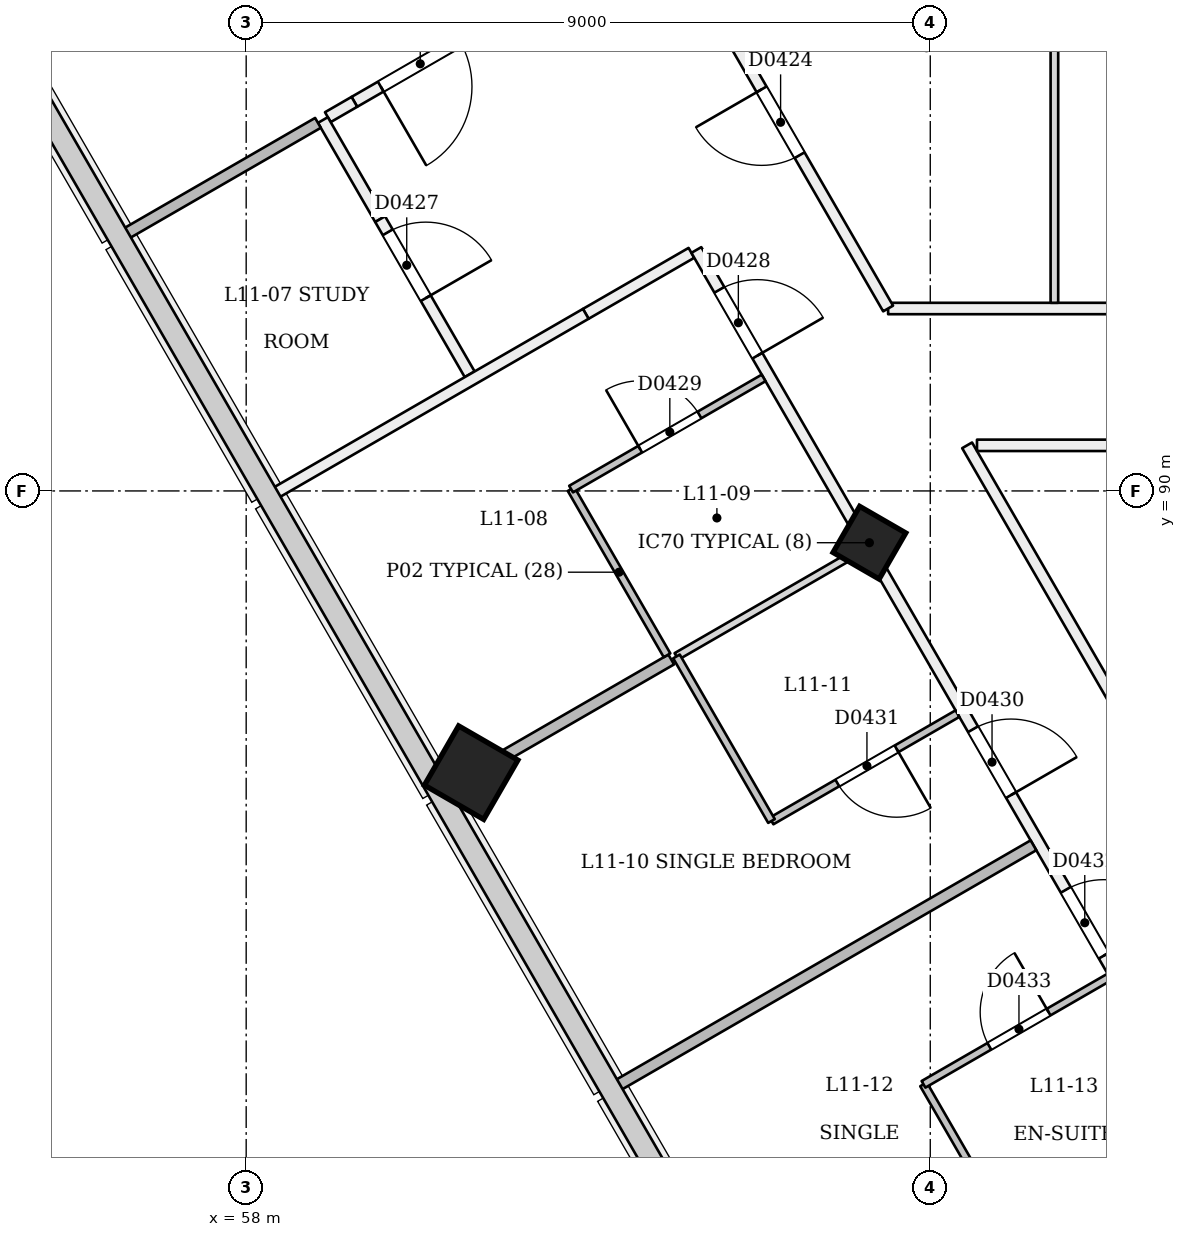
"""IFC4 building model, lengths in metres.
Left out: names, types, materials, properties, quantities, classifications, styles, units other than length and angle.
Written with IfcOpenShell. Run it as: python <this file> out.ifc"""

import sys

from ifc_helpers import new_model, si_unit, direction, frame, frame_2d, origin, origin_2d, place, context, subcontext, project, spatial, rectangle, extrude, element, fill, save


model = new_model("IFC4")
c1 = context("Model", 3, precision=1e-05, world=origin(), true_north=direction((0.0, 1.0)))
c2 = subcontext(c1, "Body", "Model", "MODEL_VIEW")
j1 = project(units=[si_unit("LENGTHUNIT", "METRE"), si_unit("PLANEANGLEUNIT", "RADIAN")], contexts=[c1])
p1 = place(None, origin())
s1 = spatial("IfcSite", under=j1, at=p1, CompositionType="ELEMENT")
p2 = place(p1, origin())
s2 = spatial("IfcBuilding", under=s1, at=p2, CompositionType="ELEMENT")
p3 = place(p2, frame((0.0, 0.0, 48.6)))
s3 = spatial("IfcBuildingStorey", under=s2, at=p3, CompositionType="ELEMENT", Elevation=48.6)
p4 = place(p3, frame((66.172, 89.272, -0.021), z_axis=(0.022222852987, 0.038483477124, 0.999012095419), x_axis=(-0.865643603437, -0.499179364078, 0.03848524793)))
e1 = element("IfcColumn", 1, at=p4, inside=s3, PredefinedType="COLUMN", context=c2, shape_type="SweptSolid", body=[
    extrude(rectangle(XDim=0.7, YDim=0.7, at=origin_2d()), origin(), (0.0, 0.0, 1.0), 3.604),
])
p5 = place(p3, frame((60.933, 86.247, -0.027), z_axis=(0.02215519141, 0.038415882353, 0.999016199807), x_axis=(-0.865366159559, -0.499666334629, 0.038405259133)))
e2 = element("IfcColumn", 2, at=p5, inside=s3, PredefinedType="COLUMN", context=c2, shape_type="SweptSolid", body=[
    extrude(rectangle(XDim=0.9, YDim=0.9, at=origin_2d()), origin(), (0.0, 0.0, 1.0), 3.604),
])
p6 = place(p3, frame((70.125, 92.4, 0.0), z_axis=(0.0, 0.0, 1.0), x_axis=(-1.0, 0.0, 0.0)))
e3 = element("IfcWall", 3, at=p6, inside=s3, PredefinedType="PARTITIONING", context=c2, shape_type="SweptSolid", body=[
    extrude(rectangle(XDim=3.679, YDim=0.15, at=frame_2d((1.84, 0.0))), origin(), (0.0, 0.0, 1.0), 3.1),
])
p7 = place(p3, frame((66.446, 92.4, 0.0), z_axis=(0.0, 0.0, 1.0), x_axis=(-0.500000789788, 0.8660249478, 0.0)))
e4 = element("IfcWall", 4, at=p7, inside=s3, PredefinedType="PARTITIONING", context=c2, shape_type="SweptSolid", body=[
    extrude(rectangle(XDim=5.011, YDim=0.15, at=frame_2d((2.506, 0.0))), origin(), (0.0, 0.0, 1.0), 3.1),
])
p8 = place(p7, frame((2.329, 0.0, 0.0)))
e5 = element("IfcOpeningElement", 5, at=p8, cuts=e4, PredefinedType="OPENING", context=c2, shape_type="SweptSolid", body=[
    extrude(rectangle(XDim=1.0, YDim=2.1, at=frame_2d((0.5, 1.05))), frame((0.0, 0.085, 0.0), z_axis=(0.0, -1.0, 0.0), x_axis=(1.0, 0.0, 0.0)), (0.0, 0.0, 1.0), 0.171),
])
p9 = place(p3, frame((61.954, 96.58, 0.0), z_axis=(0.0, 0.0, 1.0), x_axis=(-0.866013036001, -0.500021421018, 0.0)))
e6 = element("IfcWall", 6, at=p9, inside=s3, PredefinedType="PARTITIONING", context=c2, shape_type="SweptSolid", body=[
    extrude(rectangle(XDim=2.922, YDim=0.15, at=frame_2d((1.461, 0.0))), origin(), (0.0, 0.0, 1.0), 3.1),
])
p10 = place(p9, frame((1.321, 0.0, 0.0)))
e7 = element("IfcOpeningElement", 7, at=p10, cuts=e6, PredefinedType="OPENING", context=c2, shape_type="SweptSolid", body=[
    extrude(rectangle(XDim=1.2, YDim=2.1, at=frame_2d((0.6, 1.05))), frame((0.0, 0.085, 0.0), z_axis=(0.0, -1.0, 0.0), x_axis=(1.0, 0.0, 0.0)), (0.0, 0.0, 1.0), 0.171),
])
p11 = place(p3, frame((59.424, 95.119, 0.0), z_axis=(0.0, 0.0, 1.0), x_axis=(-0.866074730264, -0.499914554297, 0.0)))
e8 = element("IfcWall", 8, at=p11, inside=s3, PredefinedType="PARTITIONING", context=c2, shape_type="SweptSolid", body=[
    extrude(rectangle(XDim=0.403, YDim=0.15, at=frame_2d((0.202, 0.0))), origin(), (0.0, 0.0, 1.0), 2.6),
])
p12 = place(p3, frame((59.009, 94.88, 0.0), z_axis=(0.0, 0.0, 1.0), x_axis=(0.500045262687, -0.865999269783, 0.0)))
e9 = element("IfcWall", 9, at=p12, inside=s3, PredefinedType="PARTITIONING", context=c2, shape_type="SweptSolid", body=[
    extrude(rectangle(XDim=1.506, YDim=0.15, at=frame_2d((0.753, 0.0))), origin(), (0.0, 0.0, 1.0), 2.6),
])
p13 = place(p3, frame((59.762, 93.576, 0.0), z_axis=(0.0, 0.0, 1.0), x_axis=(0.500027327967, -0.8660096254, 0.0)))
e10 = element("IfcWall", 10, at=p13, inside=s3, PredefinedType="PARTITIONING", context=c2, shape_type="SweptSolid", body=[
    extrude(rectangle(XDim=2.357, YDim=0.15, at=frame_2d((1.178, 0.0))), origin(), (0.0, 0.0, 1.0), 3.1),
])
p14 = place(p13, frame((0.2, 0.0, 0.0)))
e11 = element("IfcOpeningElement", 11, at=p14, cuts=e10, PredefinedType="OPENING", context=c2, shape_type="SweptSolid", body=[
    extrude(rectangle(XDim=1.0, YDim=2.1, at=frame_2d((0.5, 1.05))), frame((0.0, 0.085, 0.0), z_axis=(0.0, -1.0, 0.0), x_axis=(1.0, 0.0, 0.0)), (0.0, 0.0, 1.0), 0.171),
])
p15 = place(p3, frame((62.468, 92.33, 0.0), z_axis=(0.0, 0.0, 1.0), x_axis=(0.866053882819, 0.499950669621, 0.0)))
e12 = element("IfcWall", 12, at=p15, inside=s3, PredefinedType="PARTITIONING", context=c2, shape_type="SweptSolid", body=[
    extrude(rectangle(XDim=1.605, YDim=0.15, at=frame_2d((0.803, 0.0))), origin(), (0.0, 0.0, 1.0), 3.1),
])
p16 = place(p3, frame((63.923, 93.17, 0.0), z_axis=(0.0, 0.0, 1.0), x_axis=(0.500002225217, -0.866024119051, 0.0)))
e13 = element("IfcWall", 13, at=p16, inside=s3, PredefinedType="PARTITIONING", context=c2, shape_type="SweptSolid", body=[
    extrude(rectangle(XDim=38.6, YDim=0.15, at=frame_2d((19.3, 0.0))), origin(), (0.0, 0.0, 1.0), 2.7),
])
p17 = place(p16, frame((0.605, 0.0, 0.0)))
e14 = element("IfcOpeningElement", 14, at=p17, cuts=e13, PredefinedType="OPENING", context=c2, shape_type="SweptSolid", body=[
    extrude(rectangle(XDim=1.0, YDim=2.1, at=frame_2d((0.5, 1.05))), frame((0.0, 0.085, 0.0), z_axis=(0.0, -1.0, 0.0), x_axis=(1.0, 0.0, 0.0)), (0.0, 0.0, 1.0), 0.171),
])
p18 = place(p16, frame((7.28, 0.0, 0.0)))
e15 = element("IfcOpeningElement", 15, at=p18, cuts=e13, PredefinedType="OPENING", context=c2, shape_type="SweptSolid", body=[
    extrude(rectangle(XDim=1.0, YDim=2.1, at=frame_2d((0.5, 1.05))), frame((0.0, 0.085, 0.0), z_axis=(0.0, -1.0, 0.0), x_axis=(1.0, 0.0, 0.0)), (0.0, 0.0, 1.0), 0.171),
])
p19 = place(p16, frame((9.72, 0.0, 0.0)))
e16 = element("IfcOpeningElement", 16, at=p19, cuts=e13, PredefinedType="OPENING", context=c2, shape_type="SweptSolid", body=[
    extrude(rectangle(XDim=1.0, YDim=2.1, at=frame_2d((0.5, 1.05))), frame((0.0, 0.085, 0.0), z_axis=(0.0, -1.0, 0.0), x_axis=(1.0, 0.0, 0.0)), (0.0, 0.0, 1.0), 0.171),
])
p20 = place(p16, frame((16.395, 0.0, 0.0)))
e17 = element("IfcOpeningElement", 17, at=p20, cuts=e13, PredefinedType="OPENING", context=c2, shape_type="SweptSolid", body=[
    extrude(rectangle(XDim=1.0, YDim=2.1, at=frame_2d((0.5, 1.05))), frame((0.0, 0.085, 0.0), z_axis=(0.0, -1.0, 0.0), x_axis=(1.0, 0.0, 0.0)), (0.0, 0.0, 1.0), 0.171),
])
p21 = place(p16, frame((18.72, 0.0, 0.0)))
e18 = element("IfcOpeningElement", 18, at=p21, cuts=e13, PredefinedType="OPENING", context=c2, shape_type="SweptSolid", body=[
    extrude(rectangle(XDim=1.0, YDim=2.1, at=frame_2d((0.5, 1.05))), frame((0.0, 0.085, 0.0), z_axis=(0.0, -1.0, 0.0), x_axis=(1.0, 0.0, 0.0)), (0.0, 0.0, 1.0), 0.171),
])
p22 = place(p16, frame((25.395, 0.0, 0.0)))
e19 = element("IfcOpeningElement", 19, at=p22, cuts=e13, PredefinedType="OPENING", context=c2, shape_type="SweptSolid", body=[
    extrude(rectangle(XDim=1.0, YDim=2.1, at=frame_2d((0.5, 1.05))), frame((0.0, 0.085, 0.0), z_axis=(0.0, -1.0, 0.0), x_axis=(1.0, 0.0, 0.0)), (0.0, 0.0, 1.0), 0.171),
])
p23 = place(p16, frame((27.605, 0.0, 0.0)))
e20 = element("IfcOpeningElement", 20, at=p23, cuts=e13, PredefinedType="OPENING", context=c2, shape_type="SweptSolid", body=[
    extrude(rectangle(XDim=1.0, YDim=2.1, at=frame_2d((0.5, 1.05))), frame((0.0, 0.085, 0.0), z_axis=(0.0, -1.0, 0.0), x_axis=(1.0, 0.0, 0.0)), (0.0, 0.0, 1.0), 0.171),
])
p24 = place(p16, frame((34.28, 0.0, 0.0)))
e21 = element("IfcOpeningElement", 21, at=p24, cuts=e13, PredefinedType="OPENING", context=c2, shape_type="SweptSolid", body=[
    extrude(rectangle(XDim=1.0, YDim=2.1, at=frame_2d((0.5, 1.05))), frame((0.0, 0.085, 0.0), z_axis=(0.0, -1.0, 0.0), x_axis=(1.0, 0.0, 0.0)), (0.0, 0.0, 1.0), 0.171),
])
p25 = place(p16, frame((37.342, 0.0, 0.0)))
e22 = element("IfcOpeningElement", 22, at=p25, cuts=e13, PredefinedType="OPENING", context=c2, shape_type="SweptSolid", body=[
    extrude(rectangle(XDim=1.0, YDim=2.1, at=frame_2d((0.5, 1.05))), frame((0.0, 0.085, 0.0), z_axis=(0.0, -1.0, 0.0), x_axis=(1.0, 0.0, 0.0)), (0.0, 0.0, 1.0), 0.171),
])
p26 = place(p3, frame((85.0, 60.262, 0.0), z_axis=(0.0, 0.0, 1.0), x_axis=(-0.499998554739, 0.866026238205, 0.0)))
e23 = element("IfcWall", 23, at=p26, inside=s3, PredefinedType="PARTITIONING", context=c2, shape_type="SweptSolid", body=[
    extrude(rectangle(XDim=35.031, YDim=0.15, at=frame_2d((17.515, 0.0))), origin(), (0.0, 0.0, 1.0), 3.1),
])
p27 = place(p26, frame((6.026, 0.0, 0.0)))
e24 = element("IfcOpeningElement", 24, at=p27, cuts=e23, PredefinedType="OPENING", context=c2, shape_type="SweptSolid", body=[
    extrude(rectangle(XDim=1.2, YDim=2.1, at=frame_2d((0.6, 1.05))), frame((0.0, 0.085, 0.0), z_axis=(0.0, -1.0, 0.0), x_axis=(1.0, 0.0, 0.0)), (0.0, 0.0, 1.0), 0.171),
])
p28 = place(p26, frame((19.295, 0.0, 0.0)))
e25 = element("IfcOpeningElement", 25, at=p28, cuts=e23, PredefinedType="OPENING", context=c2, shape_type="SweptSolid", body=[
    extrude(rectangle(XDim=1.2, YDim=2.1, at=frame_2d((0.6, 1.05))), frame((0.0, 0.085, 0.0), z_axis=(0.0, -1.0, 0.0), x_axis=(1.0, 0.0, 0.0)), (0.0, 0.0, 1.0), 0.171),
])
p29 = place(p26, frame((28.126, 0.0, 0.0)))
e26 = element("IfcOpeningElement", 26, at=p29, cuts=e23, PredefinedType="OPENING", context=c2, shape_type="SweptSolid", body=[
    extrude(rectangle(XDim=1.2, YDim=2.1, at=frame_2d((0.6, 1.05))), frame((0.0, 0.085, 0.0), z_axis=(0.0, -1.0, 0.0), x_axis=(1.0, 0.0, 0.0)), (0.0, 0.0, 1.0), 0.171),
])
p30 = place(p26, frame((11.927, 0.0, 0.0)))
e27 = element("IfcOpeningElement", 27, at=p30, cuts=e23, PredefinedType="OPENING", context=c2, shape_type="SweptSolid", body=[
    extrude(rectangle(XDim=1.2, YDim=2.1, at=frame_2d((0.6, 1.05))), frame((0.0, 0.085, 0.0), z_axis=(0.0, -1.0, 0.0), x_axis=(1.0, 0.0, 0.0)), (0.0, 0.0, 1.0), 0.171),
])
p31 = place(p26, frame((16.039, 0.0, 0.0)))
e28 = element("IfcOpeningElement", 28, at=p31, cuts=e23, PredefinedType="OPENING", context=c2, shape_type="SweptSolid", body=[
    extrude(rectangle(XDim=1.2, YDim=2.1, at=frame_2d((0.6, 1.05))), frame((0.0, 0.085, 0.0), z_axis=(0.0, -1.0, 0.0), x_axis=(1.0, 0.0, 0.0)), (0.0, 0.0, 1.0), 0.171),
])
p32 = place(p26, frame((23.133, 0.0, 0.0)))
e29 = element("IfcOpeningElement", 29, at=p32, cuts=e23, PredefinedType="OPENING", context=c2, shape_type="SweptSolid", body=[
    extrude(rectangle(XDim=1.0, YDim=2.1, at=frame_2d((0.5, 1.05))), frame((0.0, 0.085, 0.0), z_axis=(0.0, -1.0, 0.0), x_axis=(1.0, 0.0, 0.0)), (0.0, 0.0, 1.0), 0.171),
])
p33 = place(p3, frame((67.615, 90.6, 0.0), z_axis=(0.0, 0.0, 1.0), x_axis=(0.999999997696, -6.7885206e-05, 0.0)))
e30 = element("IfcWall", 30, at=p33, inside=s3, PredefinedType="PARTITIONING", context=c2, shape_type="SweptSolid", body=[
    extrude(rectangle(XDim=14.385, YDim=0.15, at=frame_2d((7.193, 0.0))), origin(), (0.0, 0.0, 1.0), 3.1),
])
p34 = place(p3, frame((68.633, 104.9, 0.0), z_axis=(0.0, 0.0, 1.0), x_axis=(0.0, -1.0, 0.0)))
e31 = element("IfcWall", 31, at=p34, inside=s3, PredefinedType="PARTITIONING", context=c2, shape_type="SweptSolid", body=[
    extrude(rectangle(XDim=12.425, YDim=0.1, at=frame_2d((6.212, 0.0))), origin(), (0.0, 0.0, 1.0), 2.6),
])
p35 = place(p3, frame((56.394, 93.37, 0.0), z_axis=(0.0, 0.0, 1.0), x_axis=(0.866010265175, 0.500026219923, 0.0)))
e32 = element("IfcWall", 32, at=p35, inside=s3, PredefinedType="PARTITIONING", context=c2, shape_type="SweptSolid", body=[
    extrude(rectangle(XDim=2.945, YDim=0.15, at=frame_2d((1.473, 0.0))), origin(), (0.0, 0.0, 1.0), 2.6),
])
p36 = place(p3, frame((58.363, 89.96, 0.0), z_axis=(0.0, 0.0, 1.0), x_axis=(0.866015756104, 0.5000167099, 0.0)))
e33 = element("IfcWall", 33, at=p36, inside=s3, PredefinedType="PARTITIONING", context=c2, shape_type="SweptSolid", body=[
    extrude(rectangle(XDim=4.74, YDim=0.15, at=frame_2d((2.37, 0.0))), origin(), (0.0, 0.0, 1.0), 2.6),
])
p37 = place(p3, frame((63.537, 87.838, 0.0), z_axis=(0.0, 0.0, 1.0), x_axis=(-0.500090717682, 0.865973021571, 0.0)))
e34 = element("IfcWall", 34, at=p37, inside=s3, PredefinedType="PARTITIONING", context=c2, shape_type="SweptSolid", body=[
    extrude(rectangle(XDim=2.525, YDim=0.1, at=frame_2d((1.262, 0.0))), origin(), (0.0, 0.0, 1.0), 2.7),
])
p38 = place(p3, frame((62.274, 90.024, 0.0), z_axis=(0.0, 0.0, 1.0), x_axis=(0.86601045545, 0.500025890382, 0.0)))
e35 = element("IfcWall", 35, at=p38, inside=s3, PredefinedType="PARTITIONING", context=c2, shape_type="SweptSolid", body=[
    extrude(rectangle(XDim=2.925, YDim=0.1, at=frame_2d((1.462, 0.0))), origin(), (0.0, 0.0, 1.0), 3.1),
])
p39 = place(p38, frame((1.05, 0.0, 0.0)))
e36 = element("IfcOpeningElement", 36, at=p39, cuts=e35, PredefinedType="OPENING", context=c2, shape_type="SweptSolid", body=[
    extrude(rectangle(XDim=0.9, YDim=2.1, at=frame_2d((0.45, 1.05))), frame((0.0, 0.061, 0.0), z_axis=(0.0, -1.0, 0.0), x_axis=(1.0, 0.0, 0.0)), (0.0, 0.0, 1.0), 0.121),
])
p40 = place(p3, frame((60.63, 86.073, 0.0), z_axis=(0.0, 0.0, 1.0), x_axis=(0.865989424415, 0.500062312919, 0.0)))
e37 = element("IfcWall", 37, at=p40, inside=s3, PredefinedType="PARTITIONING", context=c2, shape_type="SweptSolid", body=[
    extrude(rectangle(XDim=3.42, YDim=0.15, at=frame_2d((1.71, 0.0))), origin(), (0.0, 0.0, 1.0), 2.6),
])
p41 = place(p3, frame((63.661, 87.823, 0.0), z_axis=(0.0, 0.0, 1.0), x_axis=(0.866011447264, 0.500024172624, 0.0)))
e38 = element("IfcWall", 38, at=p41, inside=s3, PredefinedType="PARTITIONING", context=c2, shape_type="SweptSolid", body=[
    extrude(rectangle(XDim=2.825, YDim=0.1, at=frame_2d((1.413, 0.0))), origin(), (0.0, 0.0, 1.0), 2.7),
])
p42 = place(p3, frame((67.358, 87.07, 0.0), z_axis=(0.0, 0.0, 1.0), x_axis=(-0.866011447264, -0.500024172624, 0.0)))
e39 = element("IfcWall", 39, at=p42, inside=s3, PredefinedType="PARTITIONING", context=c2, shape_type="SweptSolid", body=[
    extrude(rectangle(XDim=2.825, YDim=0.1, at=frame_2d((1.413, 0.0))), origin(), (0.0, 0.0, 1.0), 3.1),
])
p43 = place(p42, frame((0.925, 0.0, 0.0)))
e40 = element("IfcOpeningElement", 40, at=p43, cuts=e39, PredefinedType="OPENING", context=c2, shape_type="SweptSolid", body=[
    extrude(rectangle(XDim=0.9, YDim=2.1, at=frame_2d((0.45, 1.05))), frame((0.0, 0.061, 0.0), z_axis=(0.0, -1.0, 0.0), x_axis=(1.0, 0.0, 0.0)), (0.0, 0.0, 1.0), 0.121),
])
p44 = place(p3, frame((64.911, 85.657, 0.0), z_axis=(0.0, 0.0, 1.0), x_axis=(-0.500004234368, 0.866022959057, 0.0)))
e41 = element("IfcWall", 41, at=p44, inside=s3, PredefinedType="PARTITIONING", context=c2, shape_type="SweptSolid", body=[
    extrude(rectangle(XDim=2.5, YDim=0.1, at=frame_2d((1.25, 0.0))), origin(), (0.0, 0.0, 1.0), 2.7),
])
p45 = place(p3, frame((62.863, 82.165, 0.0), z_axis=(0.0, 0.0, 1.0), x_axis=(0.866025401434, 0.500000004071, 0.0)))
e42 = element("IfcWall", 42, at=p45, inside=s3, PredefinedType="PARTITIONING", context=c2, shape_type="SweptSolid", body=[
    extrude(rectangle(XDim=6.345, YDim=0.15, at=frame_2d((3.173, 0.0))), origin(), (0.0, 0.0, 1.0), 2.6),
])
p46 = place(p3, frame((68.011, 80.288, 0.0), z_axis=(0.0, 0.0, 1.0), x_axis=(-0.499946605688, 0.86605622881, 0.0)))
e43 = element("IfcWall", 43, at=p46, inside=s3, PredefinedType="PARTITIONING", context=c2, shape_type="SweptSolid", body=[
    extrude(rectangle(XDim=2.2, YDim=0.1, at=frame_2d((1.1, 0.0))), origin(), (0.0, 0.0, 1.0), 3.1),
])
p47 = place(p3, frame((66.911, 82.193, 0.0), z_axis=(0.0, 0.0, 1.0), x_axis=(0.866011447264, 0.500024172624, 0.0)))
e44 = element("IfcWall", 44, at=p47, inside=s3, PredefinedType="PARTITIONING", context=c2, shape_type="SweptSolid", body=[
    extrude(rectangle(XDim=2.825, YDim=0.1, at=frame_2d((1.413, 0.0))), origin(), (0.0, 0.0, 1.0), 3.1),
])
p48 = place(p47, frame((1.0, 0.0, 0.0)))
e45 = element("IfcOpeningElement", 45, at=p48, cuts=e44, PredefinedType="OPENING", context=c2, shape_type="SweptSolid", body=[
    extrude(rectangle(XDim=0.9, YDim=2.1, at=frame_2d((0.45, 1.05))), frame((0.0, 0.061, 0.0), z_axis=(0.0, -1.0, 0.0), x_axis=(1.0, 0.0, 0.0)), (0.0, 0.0, 1.0), 0.121),
])
p49 = place(p3, frame((68.144, 80.018, 0.0), z_axis=(0.0, 0.0, 1.0), x_axis=(0.866011243319, 0.500024525844, 0.0)))
e46 = element("IfcWall", 46, at=p49, inside=s3, PredefinedType="PARTITIONING", context=c2, shape_type="SweptSolid", body=[
    extrude(rectangle(XDim=2.845, YDim=0.1, at=frame_2d((1.422, 0.0))), origin(), (0.0, 0.0, 1.0), 2.7),
])
p50 = place(p8, origin())
e47 = element("IfcDoor", 47, at=p50, inside=s3, OperationType="SINGLE_SWING_RIGHT", PredefinedType="NOTDEFINED", context=c2, shape_type="SweptSolid", body=[
    extrude(rectangle(XDim=1.0, YDim=2.1, at=frame_2d((0.5, 1.05))), frame((0.0, 0.025, 0.0), z_axis=(0.0, -1.0, 0.0), x_axis=(1.0, 0.0, 0.0)), (0.0, 0.0, 1.0), 0.05),
])
fill(e5, e47)
p51 = place(p10, origin())
e48 = element("IfcDoor", 48, at=p51, inside=s3, OperationType="SINGLE_SWING_RIGHT", PredefinedType="NOTDEFINED", context=c2, shape_type="SweptSolid", body=[
    extrude(rectangle(XDim=1.2, YDim=2.1, at=frame_2d((0.6, 1.05))), frame((0.0, 0.025, 0.0), z_axis=(0.0, -1.0, 0.0), x_axis=(1.0, 0.0, 0.0)), (0.0, 0.0, 1.0), 0.05),
])
fill(e7, e48)
p52 = place(p14, origin())
e49 = element("IfcDoor", 49, at=p52, inside=s3, OperationType="SINGLE_SWING_RIGHT", PredefinedType="NOTDEFINED", context=c2, shape_type="SweptSolid", body=[
    extrude(rectangle(XDim=1.0, YDim=2.1, at=frame_2d((0.5, 1.05))), frame((0.0, 0.025, 0.0), z_axis=(0.0, -1.0, 0.0), x_axis=(1.0, 0.0, 0.0)), (0.0, 0.0, 1.0), 0.05),
])
fill(e11, e49)
p53 = place(p17, origin())
e50 = element("IfcDoor", 50, at=p53, inside=s3, OperationType="SINGLE_SWING_RIGHT", PredefinedType="NOTDEFINED", context=c2, shape_type="SweptSolid", body=[
    extrude(rectangle(XDim=1.0, YDim=2.1, at=frame_2d((0.5, 1.05))), frame((0.0, 0.025, 0.0), z_axis=(0.0, -1.0, 0.0), x_axis=(1.0, 0.0, 0.0)), (0.0, 0.0, 1.0), 0.05),
])
fill(e14, e50)
p54 = place(p39, origin())
e51 = element("IfcDoor", 51, at=p54, inside=s3, OperationType="SINGLE_SWING_LEFT", PredefinedType="NOTDEFINED", context=c2, shape_type="SweptSolid", body=[
    extrude(rectangle(XDim=0.9, YDim=2.1, at=frame_2d((0.45, 1.05))), frame((0.0, 0.025, 0.0), z_axis=(0.0, -1.0, 0.0), x_axis=(1.0, 0.0, 0.0)), (0.0, 0.0, 1.0), 0.05),
])
fill(e36, e51)
p55 = place(p18, origin())
e52 = element("IfcDoor", 52, at=p55, inside=s3, OperationType="SINGLE_SWING_RIGHT", PredefinedType="NOTDEFINED", context=c2, shape_type="SweptSolid", body=[
    extrude(rectangle(XDim=1.0, YDim=2.1, at=frame_2d((0.5, 1.05))), frame((0.0, 0.025, 0.0), z_axis=(0.0, -1.0, 0.0), x_axis=(1.0, 0.0, 0.0)), (0.0, 0.0, 1.0), 0.05),
])
fill(e15, e52)
p56 = place(p43, origin())
e53 = element("IfcDoor", 53, at=p56, inside=s3, OperationType="SINGLE_SWING_LEFT", PredefinedType="NOTDEFINED", context=c2, shape_type="SweptSolid", body=[
    extrude(rectangle(XDim=0.9, YDim=2.1, at=frame_2d((0.45, 1.05))), frame((0.0, 0.025, 0.0), z_axis=(0.0, -1.0, 0.0), x_axis=(1.0, 0.0, 0.0)), (0.0, 0.0, 1.0), 0.05),
])
fill(e40, e53)
p57 = place(p19, origin())
e54 = element("IfcDoor", 54, at=p57, inside=s3, OperationType="SINGLE_SWING_RIGHT", PredefinedType="NOTDEFINED", context=c2, shape_type="SweptSolid", body=[
    extrude(rectangle(XDim=1.0, YDim=2.1, at=frame_2d((0.5, 1.05))), frame((0.0, 0.025, 0.0), z_axis=(0.0, -1.0, 0.0), x_axis=(1.0, 0.0, 0.0)), (0.0, 0.0, 1.0), 0.05),
])
fill(e16, e54)
p58 = place(p48, origin())
e55 = element("IfcDoor", 55, at=p58, inside=s3, OperationType="SINGLE_SWING_RIGHT", PredefinedType="NOTDEFINED", context=c2, shape_type="SweptSolid", body=[
    extrude(rectangle(XDim=0.9, YDim=2.1, at=frame_2d((0.45, 1.05))), frame((0.0, 0.025, 0.0), z_axis=(0.0, -1.0, 0.0), x_axis=(1.0, 0.0, 0.0)), (0.0, 0.0, 1.0), 0.05),
])
fill(e45, e55)
save(model, sys.argv[1])
